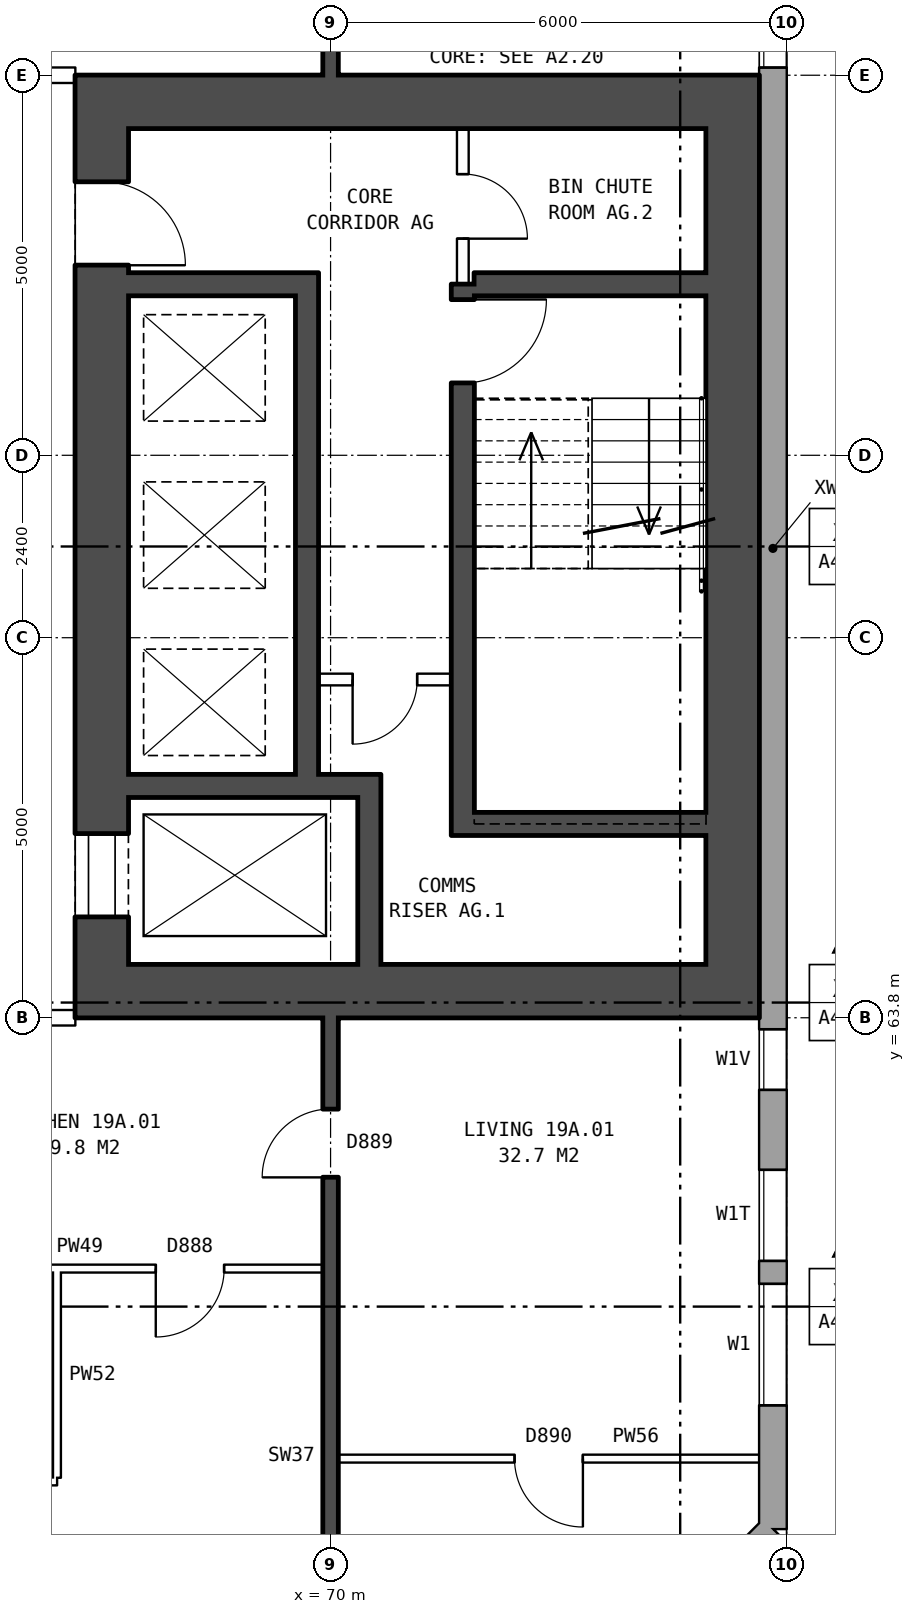
"""IFC4 building model, lengths in metres.
Left out: names, types, materials, properties, quantities, classifications, styles, units other than length and angle.
Written with IfcOpenShell. Run it as: python <this file> out.ifc"""

import sys

from ifc_helpers import new_model, si_unit, direction, frame, frame_2d, origin, place, context, subcontext, project, spatial, rectangle, extrude, element, fill, save


model = new_model("IFC4")
c1 = context("Model", 3, precision=1e-05, world=origin(), true_north=direction((0.0, 1.0)))
c2 = subcontext(c1, "Body", "Model", "MODEL_VIEW")
j1 = project(units=[si_unit("LENGTHUNIT", "METRE"), si_unit("PLANEANGLEUNIT", "RADIAN")], contexts=[c1])
p1 = place(None, origin())
s1 = spatial("IfcSite", under=j1, at=p1, CompositionType="ELEMENT")
p2 = place(p1, origin())
s2 = spatial("IfcBuilding", under=s1, at=p2, CompositionType="ELEMENT")
p3 = place(p2, frame((0.0, 0.0, 71.6)))
s3 = spatial("IfcBuildingStorey", under=s2, at=p3, CompositionType="ELEMENT", Elevation=71.6)
p4 = place(p3, frame((72.925, 54.18, 0.0), z_axis=(0.0, 0.0, 1.0), x_axis=(0.707106781187, 0.707106781187, 0.0)))
e1 = element("IfcWall", 1, at=p4, inside=s3, PredefinedType="STANDARD", context=c2, shape_type="SweptSolid", body=[
    extrude(rectangle(XDim=4.094, YDim=0.36, at=frame_2d((2.047, 0.0))), origin(), (0.0, 0.0, 1.0), 2.85),
])
p5 = place(p4, frame((1.247, 0.0, 0.8)))
e2 = element("IfcOpeningElement", 2, at=p5, cuts=e1, PredefinedType="OPENING", context=c2, shape_type="SweptSolid", body=[
    extrude(rectangle(XDim=1.6, YDim=1.8, at=frame_2d((0.8, 0.9))), frame((0.0, 0.19, 0.0), z_axis=(0.0, -1.0, 0.0), x_axis=(1.0, 0.0, 0.0)), (0.0, 0.0, 1.0), 0.38),
])
p6 = place(p3, frame((75.82, 57.075, 0.0), z_axis=(0.0, 0.0, 1.0), x_axis=(0.0, 1.0, 0.0)))
e3 = element("IfcWall", 3, at=p6, inside=s3, PredefinedType="STANDARD", context=c2, shape_type="SweptSolid", body=[
    extrude(rectangle(XDim=25.851, YDim=0.36, at=frame_2d((12.925, 0.0))), origin(), (0.0, 0.0, 1.0), 2.85),
])
p7 = place(p6, frame((1.625, 0.0, 0.8)))
e4 = element("IfcOpeningElement", 4, at=p7, cuts=e3, PredefinedType="OPENING", context=c2, shape_type="SweptSolid", body=[
    extrude(rectangle(XDim=1.6, YDim=1.8, at=frame_2d((0.8, 0.9))), frame((0.0, 0.19, 0.0), z_axis=(0.0, -1.0, 0.0), x_axis=(1.0, 0.0, 0.0)), (0.0, 0.0, 1.0), 0.38),
])
p8 = place(p6, frame((3.525, 0.0, 1.7)))
e5 = element("IfcOpeningElement", 5, at=p8, cuts=e3, PredefinedType="OPENING", context=c2, shape_type="SweptSolid", body=[
    extrude(rectangle(XDim=1.2, YDim=0.9, at=frame_2d((0.6, 0.45))), frame((0.0, 0.19, 0.0), z_axis=(0.0, -1.0, 0.0), x_axis=(1.0, 0.0, 0.0)), (0.0, 0.0, 1.0), 0.38),
])
p9 = place(p6, frame((19.225, 0.0, 0.8)))
e6 = element("IfcOpeningElement", 6, at=p9, cuts=e3, PredefinedType="OPENING", context=c2, shape_type="SweptSolid", body=[
    extrude(rectangle(XDim=0.8, YDim=0.9, at=frame_2d((0.4, 0.45))), frame((0.0, 0.19, 0.0), z_axis=(0.0, -1.0, 0.0), x_axis=(1.0, 0.0, 0.0)), (0.0, 0.0, 1.0), 0.38),
])
p10 = place(p6, frame((22.625, 0.0, 0.8)))
e7 = element("IfcOpeningElement", 7, at=p10, cuts=e3, PredefinedType="OPENING", context=c2, shape_type="SweptSolid", body=[
    extrude(rectangle(XDim=1.6, YDim=1.8, at=frame_2d((0.8, 0.9))), frame((0.0, 0.19, 0.0), z_axis=(0.0, -1.0, 0.0), x_axis=(1.0, 0.0, 0.0)), (0.0, 0.0, 1.0), 0.38),
])
p11 = place(p6, frame((5.775, 0.0, 0.8)))
e8 = element("IfcOpeningElement", 8, at=p11, cuts=e3, PredefinedType="OPENING", context=c2, shape_type="SweptSolid", body=[
    extrude(rectangle(XDim=0.8, YDim=0.9, at=frame_2d((0.4, 0.45))), frame((0.0, 0.19, 0.0), z_axis=(0.0, -1.0, 0.0), x_axis=(1.0, 0.0, 0.0)), (0.0, 0.0, 1.0), 0.38),
])
p12 = place(p6, frame((21.075, 0.0, 1.7)))
e9 = element("IfcOpeningElement", 9, at=p12, cuts=e3, PredefinedType="OPENING", context=c2, shape_type="SweptSolid", body=[
    extrude(rectangle(XDim=1.2, YDim=0.9, at=frame_2d((0.6, 0.45))), frame((0.0, 0.19, 0.0), z_axis=(0.0, -1.0, 0.0), x_axis=(1.0, 0.0, 0.0)), (0.0, 0.0, 1.0), 0.38),
])
p13 = place(p3, frame((66.99, 64.5, 0.0), z_axis=(0.0, 0.0, 1.0), x_axis=(0.0, 1.0, 0.0)))
e10 = element("IfcWall", 10, at=p13, inside=s3, PredefinedType="SHEAR", context=c2, shape_type="SweptSolid", body=[
    extrude(rectangle(XDim=11.0, YDim=0.7, at=frame_2d((5.5, 0.0))), origin(), (0.0, 0.0, 1.0), 2.85),
])
p14 = place(p13, frame((0.625, 0.0, 0.0)))
e11 = element("IfcOpeningElement", 11, at=p14, cuts=e10, PredefinedType="OPENING", context=c2, shape_type="SweptSolid", body=[
    extrude(rectangle(XDim=1.1, YDim=2.1, at=frame_2d((0.55, 1.05))), frame((0.0, 0.36, 0.0), z_axis=(0.0, -1.0, 0.0), x_axis=(1.0, 0.0, 0.0)), (0.0, 0.0, 1.0), 0.72),
])
p15 = place(p13, frame((9.2, 0.0, 0.0)))
e12 = element("IfcOpeningElement", 12, at=p15, cuts=e10, PredefinedType="OPENING", context=c2, shape_type="SweptSolid", body=[
    extrude(rectangle(XDim=1.1, YDim=2.1, at=frame_2d((0.55, 1.05))), frame((0.0, 0.36, 0.0), z_axis=(0.0, -1.0, 0.0), x_axis=(1.0, 0.0, 0.0)), (0.0, 0.0, 1.0), 0.72),
])
p16 = place(p3, frame((75.29, 64.5, 0.0), z_axis=(0.0, 0.0, 1.0), x_axis=(0.0, 1.0, 0.0)))
e13 = element("IfcWall", 13, at=p16, inside=s3, PredefinedType="SHEAR", context=c2, shape_type="SweptSolid", body=[
    extrude(rectangle(XDim=11.0, YDim=0.7, at=frame_2d((5.5, 0.0))), origin(), (0.0, 0.0, 1.0), 2.85),
])
for number, where, z_axis, x_axis in (
    (14, (66.64, 64.15, 0.0), (0.0, 0.0, 1.0), (1.0, 0.0, 0.0)),
    (15, (66.64, 75.85, 0.0), (0.0, 0.0, 1.0), (1.0, 0.0, 0.0)),
):
    element("IfcWall", number, at=place(p3, frame(where, z_axis=z_axis, x_axis=x_axis)), inside=s3, PredefinedType="SHEAR", context=c2, shape_type="SweptSolid", body=[
        extrude(rectangle(XDim=9.0, YDim=0.7, at=frame_2d((4.5, 0.0))), origin(), (0.0, 0.0, 1.0), 2.85),
    ])
p17 = place(p3, frame((71.89, 66.35, 0.0), z_axis=(0.0, 0.0, 1.0), x_axis=(1.0, 0.0, 0.0)))
e16 = element("IfcWall", 16, at=p17, inside=s3, PredefinedType="SHEAR", context=c2, shape_type="SweptSolid", body=[
    extrude(rectangle(XDim=3.05, YDim=0.3, at=frame_2d((1.525, 0.0))), origin(), (0.0, 0.0, 1.0), 2.85),
])
p18 = place(p3, frame((67.34, 66.85, 0.0), z_axis=(0.0, 0.0, 1.0), x_axis=(1.0, 0.0, 0.0)))
e17 = element("IfcWall", 17, at=p18, inside=s3, PredefinedType="SHEAR", context=c2, shape_type="SweptSolid", body=[
    extrude(rectangle(XDim=3.32, YDim=0.3, at=frame_2d((1.66, 0.0))), origin(), (0.0, 0.0, 1.0), 2.85),
])
p19 = place(p3, frame((69.84, 68.25, 0.0), z_axis=(0.0, 0.0, 1.0), x_axis=(1.0, 0.0, 0.0)))
e18 = element("IfcWall", 18, at=p19, inside=s3, PredefinedType="PARTITIONING", context=c2, shape_type="SweptSolid", body=[
    extrude(rectangle(XDim=1.75, YDim=0.15, at=frame_2d((0.875, 0.0))), origin(), (0.0, 0.0, 1.0), 2.85),
])
p20 = place(p19, frame((0.45, 0.0, 0.0)))
e19 = element("IfcOpeningElement", 19, at=p20, cuts=e18, PredefinedType="OPENING", context=c2, shape_type="SweptSolid", body=[
    extrude(rectangle(XDim=0.85, YDim=2.1, at=frame_2d((0.425, 1.05))), frame((0.0, 0.085, 0.0), z_axis=(0.0, -1.0, 0.0), x_axis=(1.0, 0.0, 0.0)), (0.0, 0.0, 1.0), 0.17),
])
p21 = place(p3, frame((67.34, 73.45, 0.0), z_axis=(0.0, 0.0, 1.0), x_axis=(1.0, 0.0, 0.0)))
e20 = element("IfcWall", 20, at=p21, inside=s3, PredefinedType="SHEAR", context=c2, shape_type="SweptSolid", body=[
    extrude(rectangle(XDim=2.2, YDim=0.3, at=frame_2d((1.1, 0.0))), origin(), (0.0, 0.0, 1.0), 2.85),
])
p22 = place(p3, frame((71.89, 73.45, 0.0), z_axis=(0.0, 0.0, 1.0), x_axis=(1.0, 0.0, 0.0)))
e21 = element("IfcWall", 21, at=p22, inside=s3, PredefinedType="SHEAR", context=c2, shape_type="SweptSolid", body=[
    extrude(rectangle(XDim=3.05, YDim=0.3, at=frame_2d((1.525, 0.0))), origin(), (0.0, 0.0, 1.0), 2.85),
])
p23 = place(p3, frame((69.69, 67.0, 0.0), z_axis=(0.0, 0.0, 1.0), x_axis=(0.0, 1.0, 0.0)))
e22 = element("IfcWall", 22, at=p23, inside=s3, PredefinedType="SHEAR", context=c2, shape_type="SweptSolid", body=[
    extrude(rectangle(XDim=6.6, YDim=0.3, at=frame_2d((3.3, 0.0))), origin(), (0.0, 0.0, 1.0), 2.85),
])
p24 = place(p3, frame((70.51, 64.5, 0.0), z_axis=(0.0, 0.0, 1.0), x_axis=(0.0, 1.0, 0.0)))
e23 = element("IfcWall", 23, at=p24, inside=s3, PredefinedType="SHEAR", context=c2, shape_type="SweptSolid", body=[
    extrude(rectangle(XDim=2.2, YDim=0.3, at=frame_2d((1.1, 0.0))), origin(), (0.0, 0.0, 1.0), 2.85),
])
p25 = place(p3, frame((71.74, 66.2, 0.0), z_axis=(0.0, 0.0, 1.0), x_axis=(0.0, 1.0, 0.0)))
e24 = element("IfcWall", 24, at=p25, inside=s3, PredefinedType="SHEAR", context=c2, shape_type="SweptSolid", body=[
    extrude(rectangle(XDim=7.25, YDim=0.3, at=frame_2d((3.625, 0.0))), origin(), (0.0, 0.0, 1.0), 2.85),
])
p26 = place(p25, frame((5.95, 0.0, 0.0)))
e25 = element("IfcOpeningElement", 25, at=p26, cuts=e24, PredefinedType="OPENING", context=c2, shape_type="SweptSolid", body=[
    extrude(rectangle(XDim=1.1, YDim=2.1, at=frame_2d((0.55, 1.05))), frame((0.0, 0.16, 0.0), z_axis=(0.0, -1.0, 0.0), x_axis=(1.0, 0.0, 0.0)), (0.0, 0.0, 1.0), 0.32),
])
p27 = place(p3, frame((71.74, 73.45, 0.0), z_axis=(0.0, 0.0, 1.0), x_axis=(0.0, 1.0, 0.0)))
e26 = element("IfcWall", 26, at=p27, inside=s3, PredefinedType="PARTITIONING", context=c2, shape_type="SweptSolid", body=[
    extrude(rectangle(XDim=2.05, YDim=0.15, at=frame_2d((1.025, 0.0))), origin(), (0.0, 0.0, 1.0), 2.85),
])
p28 = place(p27, frame((0.6, 0.0, 0.0)))
e27 = element("IfcOpeningElement", 27, at=p28, cuts=e26, PredefinedType="OPENING", context=c2, shape_type="SweptSolid", body=[
    extrude(rectangle(XDim=0.85, YDim=2.1, at=frame_2d((0.425, 1.05))), frame((0.0, 0.085, 0.0), z_axis=(0.0, -1.0, 0.0), x_axis=(1.0, 0.0, 0.0)), (0.0, 0.0, 1.0), 0.17),
])
p29 = place(p3, frame((64.1, 57.7, 0.0), z_axis=(0.0, 0.0, 1.0), x_axis=(1.0, 0.0, 0.0)))
e28 = element("IfcWall", 28, at=p29, inside=s3, PredefinedType="PARTITIONING", context=c2, shape_type="SweptSolid", body=[
    extrude(rectangle(XDim=2.3, YDim=0.1, at=frame_2d((1.15, 0.0))), origin(), (0.0, 0.0, 1.0), 2.85),
])
p30 = place(p3, frame((70.1, 58.0, 0.0), z_axis=(0.0, 0.0, 1.0), x_axis=(1.0, 0.0, 0.0)))
e29 = element("IfcWall", 29, at=p30, inside=s3, PredefinedType="PARTITIONING", context=c2, shape_type="SweptSolid", body=[
    extrude(rectangle(XDim=5.54, YDim=0.1, at=frame_2d((2.77, 0.0))), origin(), (0.0, 0.0, 1.0), 2.85),
])
p31 = place(p30, frame((2.32, 0.0, 0.0)))
e30 = element("IfcOpeningElement", 30, at=p31, cuts=e29, PredefinedType="OPENING", context=c2, shape_type="SweptSolid", body=[
    extrude(rectangle(XDim=0.9, YDim=2.1, at=frame_2d((0.45, 1.05))), frame((0.0, 0.06, 0.0), z_axis=(0.0, -1.0, 0.0), x_axis=(1.0, 0.0, 0.0)), (0.0, 0.0, 1.0), 0.12),
])
p32 = place(p3, frame((64.1, 60.5, 0.0), z_axis=(0.0, 0.0, 1.0), x_axis=(1.0, 0.0, 0.0)))
e31 = element("IfcWall", 31, at=p32, inside=s3, PredefinedType="PARTITIONING", context=c2, shape_type="SweptSolid", body=[
    extrude(rectangle(XDim=5.8, YDim=0.1, at=frame_2d((2.9, 0.0))), origin(), (0.0, 0.0, 1.0), 2.85),
])
p33 = place(p32, frame((3.6, 0.0, 0.0)))
e32 = element("IfcOpeningElement", 32, at=p33, cuts=e31, PredefinedType="OPENING", context=c2, shape_type="SweptSolid", body=[
    extrude(rectangle(XDim=0.9, YDim=2.1, at=frame_2d((0.45, 1.05))), frame((0.0, 0.06, 0.0), z_axis=(0.0, -1.0, 0.0), x_axis=(1.0, 0.0, 0.0)), (0.0, 0.0, 1.0), 0.12),
])
p34 = place(p32, frame((0.7, 0.0, 0.0)))
e33 = element("IfcOpeningElement", 33, at=p34, cuts=e31, PredefinedType="OPENING", context=c2, shape_type="SweptSolid", body=[
    extrude(rectangle(XDim=0.9, YDim=2.1, at=frame_2d((0.45, 1.05))), frame((0.0, 0.06, 0.0), z_axis=(0.0, -1.0, 0.0), x_axis=(1.0, 0.0, 0.0)), (0.0, 0.0, 1.0), 0.12),
])
p35 = place(p3, frame((63.64, 63.8, 0.0), z_axis=(0.0, 0.0, 1.0), x_axis=(1.0, 0.0, 0.0)))
e34 = element("IfcWall", 34, at=p35, inside=s3, PredefinedType="PARTITIONING", context=c2, shape_type="SweptSolid", body=[
    extrude(rectangle(XDim=3.0, YDim=0.2, at=frame_2d((1.5, 0.0))), origin(), (0.0, 0.0, 1.0), 2.85),
])
p36 = place(p35, frame((1.18, 0.0, 0.0)))
e35 = element("IfcOpeningElement", 35, at=p36, cuts=e34, PredefinedType="OPENING", context=c2, shape_type="SweptSolid", body=[
    extrude(rectangle(XDim=1.0, YDim=2.1, at=frame_2d((0.5, 1.05))), frame((0.0, 0.11, 0.0), z_axis=(0.0, -1.0, 0.0), x_axis=(1.0, 0.0, 0.0)), (0.0, 0.0, 1.0), 0.22),
])
p37 = place(p3, frame((63.64, 76.2, 0.0), z_axis=(0.0, 0.0, 1.0), x_axis=(1.0, 0.0, 0.0)))
e36 = element("IfcWall", 36, at=p37, inside=s3, PredefinedType="PARTITIONING", context=c2, shape_type="SweptSolid", body=[
    extrude(rectangle(XDim=3.0, YDim=0.2, at=frame_2d((1.5, 0.0))), origin(), (0.0, 0.0, 1.0), 2.85),
])
p38 = place(p37, frame((1.18, 0.0, 0.0)))
e37 = element("IfcOpeningElement", 37, at=p38, cuts=e36, PredefinedType="OPENING", context=c2, shape_type="SweptSolid", body=[
    extrude(rectangle(XDim=1.0, YDim=2.1, at=frame_2d((0.5, 1.05))), frame((0.0, 0.11, 0.0), z_axis=(0.0, -1.0, 0.0), x_axis=(1.0, 0.0, 0.0)), (0.0, 0.0, 1.0), 0.22),
])
p39 = place(p3, frame((66.4, 57.75, 0.0), z_axis=(0.0, 0.0, 1.0), x_axis=(0.0, 1.0, 0.0)))
e38 = element("IfcWall", 38, at=p39, inside=s3, PredefinedType="PARTITIONING", context=c2, shape_type="SweptSolid", body=[
    extrude(rectangle(XDim=2.7, YDim=0.1, at=frame_2d((1.35, 0.0))), origin(), (0.0, 0.0, 1.0), 2.85),
])
p40 = place(p3, frame((70.0, 54.36, 0.0), z_axis=(0.0, 0.0, 1.0), x_axis=(0.0, 1.0, 0.0)))
e39 = element("IfcWall", 39, at=p40, inside=s3, PredefinedType="SOLIDWALL", context=c2, shape_type="SweptSolid", body=[
    extrude(rectangle(XDim=9.44, YDim=0.2, at=frame_2d((4.72, 0.0))), origin(), (0.0, 0.0, 1.0), 2.85),
])
p41 = place(p40, frame((7.34, 0.0, 0.0)))
e40 = element("IfcOpeningElement", 40, at=p41, cuts=e39, PredefinedType="OPENING", context=c2, shape_type="SweptSolid", body=[
    extrude(rectangle(XDim=0.9, YDim=2.1, at=frame_2d((0.45, 1.05))), frame((0.0, 0.11, 0.0), z_axis=(0.0, -1.0, 0.0), x_axis=(1.0, 0.0, 0.0)), (0.0, 0.0, 1.0), 0.22),
])
p42 = place(p3, frame((70.0, 76.2, 0.0), z_axis=(0.0, 0.0, 1.0), x_axis=(0.0, 1.0, 0.0)))
e41 = element("IfcWall", 41, at=p42, inside=s3, PredefinedType="SOLIDWALL", context=c2, shape_type="SweptSolid", body=[
    extrude(rectangle(XDim=9.44, YDim=0.2, at=frame_2d((4.72, 0.0))), origin(), (0.0, 0.0, 1.0), 2.85),
])
p43 = place(p42, frame((7.17, 0.0, 0.0)))
e42 = element("IfcOpeningElement", 42, at=p43, cuts=e41, PredefinedType="OPENING", context=c2, shape_type="SweptSolid", body=[
    extrude(rectangle(XDim=0.9, YDim=2.1, at=frame_2d((0.45, 1.05))), frame((0.0, 0.11, 0.0), z_axis=(0.0, -1.0, 0.0), x_axis=(1.0, 0.0, 0.0)), (0.0, 0.0, 1.0), 0.22),
])
p44 = place(p42, frame((1.5, 0.0, 0.0)))
e43 = element("IfcOpeningElement", 43, at=p44, cuts=e41, PredefinedType="OPENING", context=c2, shape_type="SweptSolid", body=[
    extrude(rectangle(XDim=0.9, YDim=2.1, at=frame_2d((0.45, 1.05))), frame((0.0, 0.11, 0.0), z_axis=(0.0, -1.0, 0.0), x_axis=(1.0, 0.0, 0.0)), (0.0, 0.0, 1.0), 0.22),
])
p45 = place(p7, origin())
e44 = element("IfcWindow", 44, at=p45, inside=s3, PartitioningType="SINGLE_PANEL", PredefinedType="WINDOW", context=c2, shape_type="SweptSolid", body=[
    extrude(rectangle(XDim=1.6, YDim=1.8, at=frame_2d((0.8, 0.9))), frame((0.0, 0.15, 0.0), z_axis=(0.0, -1.0, 0.0), x_axis=(1.0, 0.0, 0.0)), (0.0, 0.0, 1.0), 0.06),
])
fill(e4, e44)
p46 = place(p8, origin())
e45 = element("IfcWindow", 45, at=p46, inside=s3, PartitioningType="SINGLE_PANEL", PredefinedType="WINDOW", context=c2, shape_type="SweptSolid", body=[
    extrude(rectangle(XDim=1.2, YDim=0.9, at=frame_2d((0.6, 0.45))), frame((0.0, 0.15, 0.0), z_axis=(0.0, -1.0, 0.0), x_axis=(1.0, 0.0, 0.0)), (0.0, 0.0, 1.0), 0.06),
])
fill(e5, e45)
p47 = place(p9, origin())
e46 = element("IfcWindow", 46, at=p47, inside=s3, PartitioningType="SINGLE_PANEL", PredefinedType="WINDOW", context=c2, shape_type="SweptSolid", body=[
    extrude(rectangle(XDim=0.8, YDim=0.9, at=frame_2d((0.4, 0.45))), frame((0.0, 0.15, 0.0), z_axis=(0.0, -1.0, 0.0), x_axis=(1.0, 0.0, 0.0)), (0.0, 0.0, 1.0), 0.06),
])
fill(e6, e46)
p48 = place(p14, origin())
e47 = element("IfcDoor", 47, at=p48, inside=s3, OperationType="DOUBLE_DOOR_SLIDING", PredefinedType="DOOR", context=c2, shape_type="SweptSolid", body=[
    extrude(rectangle(XDim=1.1, YDim=2.1, at=frame_2d((0.55, 1.05))), frame((0.0, -0.285, 0.0), z_axis=(0.0, -1.0, 0.0), x_axis=(1.0, 0.0, 0.0)), (0.0, 0.0, 1.0), 0.05),
])
fill(e11, e47)
p49 = place(p15, frame((1.1, 0.0, 0.0), z_axis=(0.0, 0.0, 1.0), x_axis=(-1.0, 0.0, 0.0)))
e48 = element("IfcDoor", 48, at=p49, inside=s3, OperationType="SINGLE_SWING_RIGHT", PredefinedType="DOOR", context=c2, shape_type="SweptSolid", body=[
    extrude(rectangle(XDim=1.1, YDim=2.1, at=frame_2d((0.55, 1.05))), frame((0.0, 0.335, 0.0), z_axis=(0.0, -1.0, 0.0), x_axis=(1.0, 0.0, 0.0)), (0.0, 0.0, 1.0), 0.05),
])
fill(e12, e48)
p50 = place(p26, frame((1.1, 0.0, 0.0), z_axis=(0.0, 0.0, 1.0), x_axis=(-1.0, 0.0, 0.0)))
e49 = element("IfcDoor", 49, at=p50, inside=s3, OperationType="SINGLE_SWING_LEFT", PredefinedType="DOOR", context=c2, shape_type="SweptSolid", body=[
    extrude(rectangle(XDim=1.1, YDim=2.1, at=frame_2d((0.55, 1.05))), frame((0.0, 0.025, 0.0), z_axis=(0.0, -1.0, 0.0), x_axis=(1.0, 0.0, 0.0)), (0.0, 0.0, 1.0), 0.05),
])
fill(e25, e49)
p51 = place(p20, frame((0.85, 0.0, 0.0), z_axis=(0.0, 0.0, 1.0), x_axis=(-1.0, 0.0, 0.0)))
e50 = element("IfcDoor", 50, at=p51, inside=s3, OperationType="SINGLE_SWING_RIGHT", PredefinedType="DOOR", context=c2, shape_type="SweptSolid", body=[
    extrude(rectangle(XDim=0.85, YDim=2.1, at=frame_2d((0.425, 1.05))), frame((0.0, 0.025, 0.0), z_axis=(0.0, -1.0, 0.0), x_axis=(1.0, 0.0, 0.0)), (0.0, 0.0, 1.0), 0.05),
])
fill(e19, e50)
p52 = place(p28, frame((0.85, 0.0, 0.0), z_axis=(0.0, 0.0, 1.0), x_axis=(-1.0, 0.0, 0.0)))
e51 = element("IfcDoor", 51, at=p52, inside=s3, OperationType="SINGLE_SWING_RIGHT", PredefinedType="DOOR", context=c2, shape_type="SweptSolid", body=[
    extrude(rectangle(XDim=0.85, YDim=2.1, at=frame_2d((0.425, 1.05))), frame((0.0, 0.025, 0.0), z_axis=(0.0, -1.0, 0.0), x_axis=(1.0, 0.0, 0.0)), (0.0, 0.0, 1.0), 0.05),
])
fill(e27, e51)
p53 = place(p33, frame((0.9, 0.0, 0.0), z_axis=(0.0, 0.0, 1.0), x_axis=(-1.0, 0.0, 0.0)))
e52 = element("IfcDoor", 52, at=p53, inside=s3, OperationType="SINGLE_SWING_RIGHT", PredefinedType="DOOR", context=c2, shape_type="SweptSolid", body=[
    extrude(rectangle(XDim=0.9, YDim=2.1, at=frame_2d((0.45, 1.05))), frame((0.0, 0.025, 0.0), z_axis=(0.0, -1.0, 0.0), x_axis=(1.0, 0.0, 0.0)), (0.0, 0.0, 1.0), 0.05),
])
fill(e32, e52)
p54 = place(p31, frame((0.9, 0.0, 0.0), z_axis=(0.0, 0.0, 1.0), x_axis=(-1.0, 0.0, 0.0)))
e53 = element("IfcDoor", 53, at=p54, inside=s3, OperationType="SINGLE_SWING_LEFT", PredefinedType="DOOR", context=c2, shape_type="SweptSolid", body=[
    extrude(rectangle(XDim=0.9, YDim=2.1, at=frame_2d((0.45, 1.05))), frame((0.0, 0.025, 0.0), z_axis=(0.0, -1.0, 0.0), x_axis=(1.0, 0.0, 0.0)), (0.0, 0.0, 1.0), 0.05),
])
fill(e30, e53)
p55 = place(p41, origin())
e54 = element("IfcDoor", 54, at=p55, inside=s3, OperationType="SINGLE_SWING_LEFT", PredefinedType="DOOR", context=c2, shape_type="SweptSolid", body=[
    extrude(rectangle(XDim=0.9, YDim=2.1, at=frame_2d((0.45, 1.05))), frame((0.0, 0.025, 0.0), z_axis=(0.0, -1.0, 0.0), x_axis=(1.0, 0.0, 0.0)), (0.0, 0.0, 1.0), 0.05),
])
fill(e40, e54)
p56 = place(p11, origin())
e55 = element("IfcWindow", 55, at=p56, inside=s3, PartitioningType="SINGLE_PANEL", PredefinedType="WINDOW", context=c2, shape_type="SweptSolid", body=[
    extrude(rectangle(XDim=0.8, YDim=0.9, at=frame_2d((0.4, 0.45))), frame((0.0, 0.15, 0.0), z_axis=(0.0, -1.0, 0.0), x_axis=(1.0, 0.0, 0.0)), (0.0, 0.0, 1.0), 0.06),
])
fill(e8, e55)
save(model, sys.argv[1])
